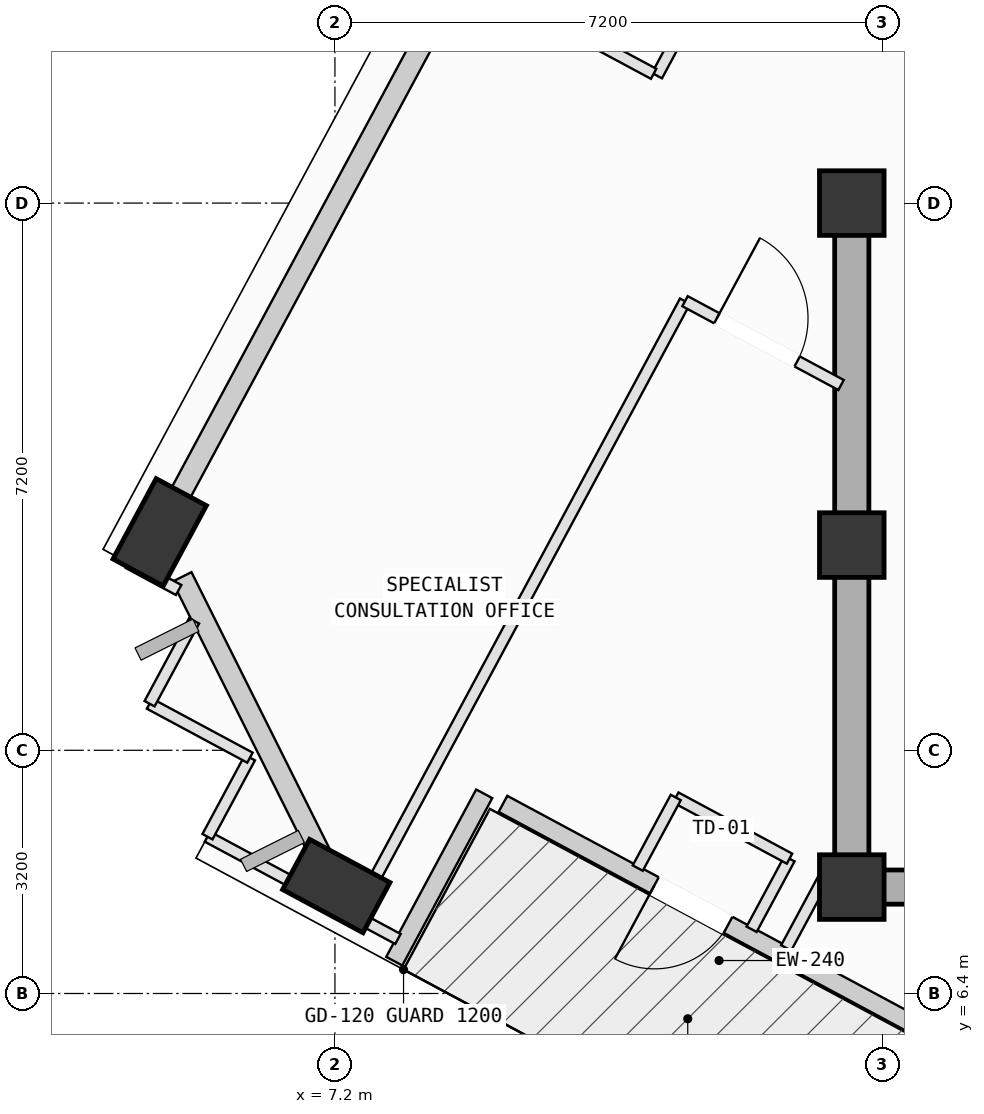
"""IFC4 building model, lengths in metres.
Left out: names, types, materials, properties, quantities, classifications, styles, units other than length and angle.
Written with IfcOpenShell. Run it as: python <this file> out.ifc"""

import sys

from ifc_helpers import new_model, si_unit, direction, frame, frame_2d, origin, origin_2d, place, context, subcontext, project, spatial, rectangle, extrude, element, fill, save


model = new_model("IFC4")
c1 = context("Model", 3, precision=1e-05, world=origin(), true_north=direction((0.0, 1.0)))
c2 = subcontext(c1, "Body", "Model", "MODEL_VIEW")
j1 = project(units=[si_unit("LENGTHUNIT", "METRE"), si_unit("PLANEANGLEUNIT", "RADIAN")], contexts=[c1])
p1 = place(None, origin())
s1 = spatial("IfcSite", under=j1, at=p1, CompositionType="ELEMENT")
p2 = place(p1, origin())
s2 = spatial("IfcBuilding", under=s1, at=p2, CompositionType="ELEMENT")
p3 = place(p2, frame((0.0, 0.0, 288.6)))
s3 = spatial("IfcBuildingStorey", under=s2, at=p3, CompositionType="ELEMENT", Elevation=288.6)
for number, where, z_axis, x_axis in (
    (1, (14.0, 7.8, 0.0), (0.0, 0.0, 1.0), (1.0, 0.0, 0.0)),
    (2, (14.0, 12.3, 0.0), (0.0, 0.0, 1.0), (1.0, 0.0, 0.0)),
    (3, (14.0, 16.8, 0.0), (0.0, 0.0, 1.0), (1.0, 0.0, 0.0)),
):
    element("IfcColumn", number, at=place(p3, frame(where, z_axis=z_axis, x_axis=x_axis)), inside=s3, PredefinedType="COLUMN", context=c2, shape_type="SweptSolid", body=[
        extrude(rectangle(XDim=0.85, YDim=0.85, at=origin_2d()), origin(), (0.0, 0.0, 1.0), 4.0),
    ])
p4 = place(p3, frame((8.775, 19.691, 0.002), z_axis=(0.021872497794, -0.102132413311, 0.994530323314), x_axis=(0.279366922613, 0.955766050838, 0.092007492169)))
e4 = element("IfcColumn", 4, at=p4, inside=s3, PredefinedType="COLUMN", context=c2, shape_type="SweptSolid", body=[
    extrude(rectangle(XDim=1.2, YDim=0.75, at=origin_2d()), origin(), (0.0, 0.0, 1.0), 4.018),
])
p5 = place(p3, frame((4.894, 12.468, 0.002), z_axis=(0.051679010826, -0.117595498256, 0.991715976795), x_axis=(0.081851400023, 0.990200644912, 0.113150480027)))
e5 = element("IfcColumn", 5, at=p5, inside=s3, PredefinedType="COLUMN", context=c2, shape_type="SweptSolid", body=[
    extrude(rectangle(XDim=1.2, YDim=0.75, at=origin_2d()), origin(), (0.0, 0.0, 1.0), 4.03),
])
p6 = place(p3, frame((7.218, 7.814, 0.002), z_axis=(0.070698136038, -0.107834346313, 0.991651918425), x_axis=(-0.994028901096, -0.090452695087, 0.061031579835)))
e6 = element("IfcColumn", 6, at=p6, inside=s3, PredefinedType="COLUMN", context=c2, shape_type="SweptSolid", body=[
    extrude(rectangle(XDim=1.2, YDim=0.75, at=origin_2d()), origin(), (0.0, 0.0, 1.0), 4.03),
])
p7 = place(p3, frame((15.542, 5.601, 0.0), z_axis=(0.0, 0.0, 1.0), x_axis=(-0.88087851572, 0.473342413632, 0.0)))
e7 = element("IfcWall", 7, at=p7, inside=s3, PredefinedType="SOLIDWALL", context=c2, shape_type="SweptSolid", body=[
    extrude(rectangle(XDim=6.96, YDim=0.24, at=frame_2d((3.48, 0.0))), origin(), (0.0, 0.0, 1.0), 3.265),
])
p8 = place(p7, frame((3.597, 0.0, 0.0)))
e8 = element("IfcOpeningElement", 8, at=p8, cuts=e7, PredefinedType="OPENING", context=c2, shape_type="SweptSolid", body=[
    extrude(rectangle(XDim=1.1, YDim=2.15, at=frame_2d((0.55, 1.075))), frame((0.0, 0.13, 0.0), z_axis=(0.0, -1.0, 0.0), x_axis=(1.0, 0.0, 0.0)), (0.0, 0.0, 1.0), 0.26),
])
p9 = place(p3, frame((9.164, 9.027, 0.0), z_axis=(0.0, 0.0, 1.0), x_axis=(-0.473348400497, -0.880875298636, 0.0)))
e9 = element("IfcWall", 9, at=p9, inside=s3, PredefinedType="SOLIDWALL", context=c2, shape_type="SweptSolid", body=[
    extrude(rectangle(XDim=2.5, YDim=0.24, at=frame_2d((1.25, 0.0))), origin(), (0.0, 0.0, 1.0), 3.265),
])
p10 = place(p3, frame((4.98, 12.628, 0.0), z_axis=(0.0, 0.0, 1.0), x_axis=(0.473337134164, 0.880881352636, 0.0)))
e10 = element("IfcWall", 10, at=p10, inside=s3, PredefinedType="SOLIDWALL", context=c2, shape_type="SweptSolid", body=[
    extrude(rectangle(XDim=7.485, YDim=0.28, at=frame_2d((3.742, 0.0))), origin(), (0.0, 0.0, 1.0), 3.265),
])
p11 = place(p3, frame((7.156, 7.938, 0.0), z_axis=(0.0, 0.0, 1.0), x_axis=(-0.446726151208, 0.894670747162, 0.0)))
e11 = element("IfcWall", 11, at=p11, inside=s3, PredefinedType="SOLIDWALL", context=c2, shape_type="SweptSolid", body=[
    extrude(rectangle(XDim=4.408, YDim=0.28, at=frame_2d((2.204, 0.0))), origin(), (0.0, 0.0, 1.0), 3.245),
])
p12 = place(p3, frame((14.0, 7.8, 0.0), z_axis=(0.0, 0.0, 1.0), x_axis=(1.0, 0.0, 0.0)))
e12 = element("IfcWall", 12, at=p12, inside=s3, PredefinedType="SHEAR", context=c2, shape_type="SweptSolid", body=[
    extrude(rectangle(XDim=10.8, YDim=0.45, at=frame_2d((5.4, 0.0))), origin(), (0.0, 0.0, 1.0), 3.78),
])
p13 = place(p3, frame((14.0, 16.8, 0.0), z_axis=(0.0, 0.0, 1.0), x_axis=(0.0, -1.0, 0.0)))
e13 = element("IfcWall", 13, at=p13, inside=s3, PredefinedType="SHEAR", context=c2, shape_type="SweptSolid", body=[
    extrude(rectangle(XDim=9.0, YDim=0.45, at=frame_2d((4.5, 0.0))), origin(), (0.0, 0.0, 1.0), 3.78),
])
p14 = place(p3, frame((13.137, 7.0, 0.0), z_axis=(0.0, 0.0, 1.0), x_axis=(0.473548662822, 0.880767656047, 0.0)))
e14 = element("IfcWall", 14, at=p14, inside=s3, PredefinedType="PARTITIONING", context=c2, shape_type="SweptSolid", body=[
    extrude(rectangle(XDim=1.189, YDim=0.15, at=frame_2d((0.594, 0.0))), origin(), (0.0, 0.0, 1.0), 3.145),
])
p15 = place(p3, frame((12.682, 7.245, 0.0), z_axis=(0.0, 0.0, 1.0), x_axis=(0.473229793315, 0.88093902327, 0.0)))
e15 = element("IfcWall", 15, at=p15, inside=s3, PredefinedType="PARTITIONING", context=c2, shape_type="SweptSolid", body=[
    extrude(rectangle(XDim=1.054, YDim=0.15, at=frame_2d((0.527, 0.0))), origin(), (0.0, 0.0, 1.0), 3.78),
])
p16 = place(p3, frame((13.181, 8.174, 0.0), z_axis=(0.0, 0.0, 1.0), x_axis=(-0.880729278923, 0.473620034678, 0.0)))
e16 = element("IfcWall", 16, at=p16, inside=s3, PredefinedType="PARTITIONING", context=c2, shape_type="SweptSolid", body=[
    extrude(rectangle(XDim=1.699, YDim=0.15, at=frame_2d((0.85, 0.0))), origin(), (0.0, 0.0, 1.0), 3.78),
])
p17 = place(p3, frame((11.684, 8.979, 0.0), z_axis=(0.0, 0.0, 1.0), x_axis=(-0.473948013008, -0.880552826902, 0.0)))
e17 = element("IfcWall", 17, at=p17, inside=s3, PredefinedType="PARTITIONING", context=c2, shape_type="SweptSolid", body=[
    extrude(rectangle(XDim=1.055, YDim=0.15, at=frame_2d((0.527, 0.0))), origin(), (0.0, 0.0, 1.0), 3.78),
])
p18 = place(p3, frame((8.029, 7.117, 0.0), z_axis=(0.0, 0.0, 1.0), x_axis=(-0.880944747139, 0.473219137913, 0.0)))
e18 = element("IfcWall", 18, at=p18, inside=s3, PredefinedType="PARTITIONING", context=c2, shape_type="SweptSolid", body=[
    extrude(rectangle(XDim=0.645, YDim=0.15, at=frame_2d((0.322, 0.0))), origin(), (0.0, 0.0, 1.0), 3.245),
])
p19 = place(p3, frame((7.461, 7.422, 0.0), z_axis=(0.0, 0.0, 1.0), x_axis=(0.473295580146, 0.880903680214, 0.0)))
e19 = element("IfcWall", 19, at=p19, inside=s3, PredefinedType="PARTITIONING", context=c2, shape_type="SweptSolid", body=[
    extrude(rectangle(XDim=9.18, YDim=0.15, at=frame_2d((4.59, 0.0))), origin(), (0.0, 0.0, 1.0), 3.78),
])
p20 = place(p3, frame((11.806, 15.509, 0.0), z_axis=(0.0, 0.0, 1.0), x_axis=(0.880904657271, -0.47329376163, 0.0)))
e20 = element("IfcWall", 20, at=p20, inside=s3, PredefinedType="PARTITIONING", context=c2, shape_type="SweptSolid", body=[
    extrude(rectangle(XDim=2.331, YDim=0.15, at=frame_2d((1.165, 0.0))), origin(), (0.0, 0.0, 1.0), 3.78),
])
p21 = place(p20, frame((0.475, 0.0, 0.0)))
e21 = element("IfcOpeningElement", 21, at=p21, cuts=e20, PredefinedType="OPENING", context=c2, shape_type="SweptSolid", body=[
    extrude(rectangle(XDim=1.2, YDim=2.15, at=frame_2d((0.6, 1.075))), frame((0.0, 0.085, 0.0), z_axis=(0.0, -1.0, 0.0), x_axis=(1.0, 0.0, 0.0)), (0.0, 0.0, 1.0), 0.17),
])
p22 = place(p3, frame((5.144, 11.709, 0.0), z_axis=(0.0, 0.0, 1.0), x_axis=(-0.880742885234, 0.473594731927, 0.0)))
e22 = element("IfcWall", 22, at=p22, inside=s3, PredefinedType="PARTITIONING", context=c2, shape_type="SweptSolid", body=[
    extrude(rectangle(XDim=0.75, YDim=0.15, at=frame_2d((0.375, 0.0))), origin(), (0.0, 0.0, 1.0), 3.78),
])
p23 = place(p3, frame((4.484, 12.064, 0.0), z_axis=(0.0, 0.0, 1.0), x_axis=(0.472906122879, 0.88111281851, 0.0)))
e23 = element("IfcWall", 23, at=p23, inside=s3, PredefinedType="PARTITIONING", context=c2, shape_type="SweptSolid", body=[
    extrude(rectangle(XDim=0.732, YDim=0.15, at=frame_2d((0.366, 0.0))), origin(), (0.0, 0.0, 1.0), 3.78),
])
p24 = place(p3, frame((7.32, 7.498, 0.0), z_axis=(0.0, 0.0, 1.0), x_axis=(-0.881050780424, 0.47302169328, 0.0)))
e24 = element("IfcWall", 24, at=p24, inside=s3, PredefinedType="PARTITIONING", context=c2, shape_type="SweptSolid", body=[
    extrude(rectangle(XDim=2.04, YDim=0.15, at=frame_2d((1.02, 0.0))), origin(), (0.0, 0.0, 1.0), 3.245),
])
p25 = place(p3, frame((5.523, 8.463, 0.0), z_axis=(0.0, 0.0, 1.0), x_axis=(0.473483216914, 0.880802840198, 0.0)))
e25 = element("IfcWall", 25, at=p25, inside=s3, PredefinedType="PARTITIONING", context=c2, shape_type="SweptSolid", body=[
    extrude(rectangle(XDim=1.181, YDim=0.15, at=frame_2d((0.59, 0.0))), origin(), (0.0, 0.0, 1.0), 3.78),
])
p26 = place(p3, frame((6.082, 9.503, 0.0), z_axis=(0.0, 0.0, 1.0), x_axis=(-0.880852398613, 0.473391013707, 0.0)))
e26 = element("IfcWall", 26, at=p26, inside=s3, PredefinedType="PARTITIONING", context=c2, shape_type="SweptSolid", body=[
    extrude(rectangle(XDim=1.5, YDim=0.15, at=frame_2d((0.75, 0.0))), origin(), (0.0, 0.0, 1.0), 3.78),
])
p27 = place(p3, frame((4.761, 10.213, 0.0), z_axis=(0.0, 0.0, 1.0), x_axis=(0.473452679228, 0.880819255314, 0.0)))
e27 = element("IfcWall", 27, at=p27, inside=s3, PredefinedType="PARTITIONING", context=c2, shape_type="SweptSolid", body=[
    extrude(rectangle(XDim=1.238, YDim=0.15, at=frame_2d((0.619, 0.0))), origin(), (0.0, 0.0, 1.0), 3.78),
])
p28 = place(p3, frame((12.345, 20.165, 0.0), z_axis=(0.0, 0.0, 1.0), x_axis=(-0.47371238965, -0.880679607969, 0.0)))
e28 = element("IfcWall", 28, at=p28, inside=s3, PredefinedType="PARTITIONING", context=c2, shape_type="SweptSolid", body=[
    extrude(rectangle(XDim=1.917, YDim=0.15, at=frame_2d((0.958, 0.0))), origin(), (0.0, 0.0, 1.0), 3.415),
])
p29 = place(p3, frame((11.393, 18.501, 0.0), z_axis=(0.0, 0.0, 1.0), x_axis=(-0.880919921117, 0.473265351128, 0.0)))
e29 = element("IfcWall", 29, at=p29, inside=s3, PredefinedType="PARTITIONING", context=c2, shape_type="SweptSolid", body=[
    extrude(rectangle(XDim=2.757, YDim=0.15, at=frame_2d((1.379, 0.0))), origin(), (0.0, 0.0, 1.0), 3.78),
])
p30 = place(p8, origin())
e30 = element("IfcDoor", 30, at=p30, inside=s3, OperationType="SINGLE_SWING_RIGHT", PredefinedType="DOOR", context=c2, shape_type="SweptSolid", body=[
    extrude(rectangle(XDim=1.1, YDim=2.15, at=frame_2d((0.55, 1.075))), frame((0.0, 0.025, 0.0), z_axis=(0.0, -1.0, 0.0), x_axis=(1.0, 0.0, 0.0)), (0.0, 0.0, 1.0), 0.05),
])
fill(e8, e30)
p31 = place(p21, origin())
e31 = element("IfcDoor", 31, at=p31, inside=s3, OperationType="SINGLE_SWING_LEFT", PredefinedType="DOOR", context=c2, shape_type="SweptSolid", body=[
    extrude(rectangle(XDim=1.2, YDim=2.15, at=frame_2d((0.6, 1.075))), frame((0.0, 0.025, 0.0), z_axis=(0.0, -1.0, 0.0), x_axis=(1.0, 0.0, 0.0)), (0.0, 0.0, 1.0), 0.05),
])
fill(e21, e31)
save(model, sys.argv[1])
